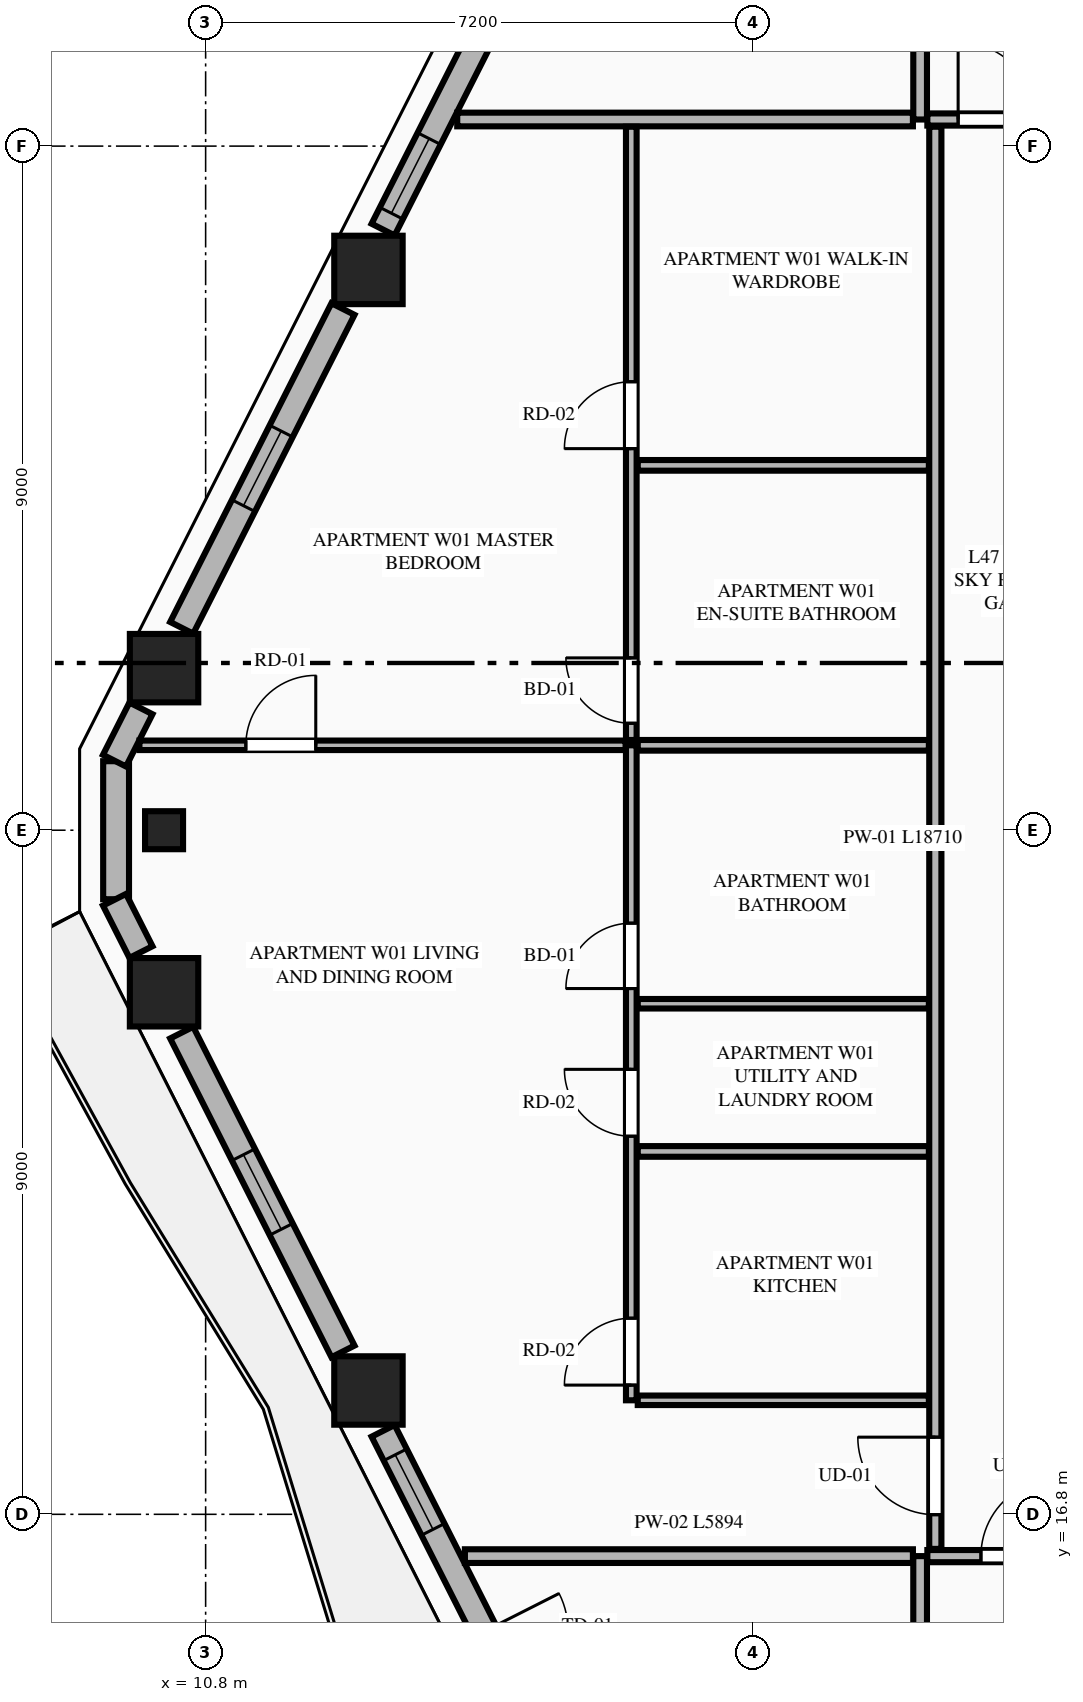
"""IFC4 building model, lengths in metres.
Left out: names, types, materials, properties, quantities, classifications, styles, units other than length and angle.
Written with IfcOpenShell. Run it as: python <this file> out.ifc"""

import sys

from ifc_helpers import new_model, si_unit, direction, frame, frame_2d, origin, origin_2d, place, context, subcontext, project, spatial, rectangle, extrude, element, fill, save


model = new_model("IFC4")
c1 = context("Model", 3, precision=1e-05, world=origin(), true_north=direction((0.0, 1.0)))
c2 = subcontext(c1, "Body", "Model", "MODEL_VIEW")
j1 = project(units=[si_unit("LENGTHUNIT", "METRE"), si_unit("PLANEANGLEUNIT", "RADIAN")], contexts=[c1])
p1 = place(None, origin())
s1 = spatial("IfcSite", under=j1, at=p1, CompositionType="ELEMENT")
p2 = place(p1, origin())
s2 = spatial("IfcBuilding", under=s1, at=p2, CompositionType="ELEMENT")
p3 = place(p2, frame((0.0, 0.0, 179.0)))
s3 = spatial("IfcBuildingStorey", under=s2, at=p3, CompositionType="ELEMENT", Elevation=179.0)
for number, where, z_axis, x_axis in (
    (1, (12.942, 33.171, 0.0), (0.0, 0.0, 1.0), (1.0, 0.0, 0.0)),
    (2, (10.253, 27.932, 0.0), (0.0, 0.0, 1.0), (1.0, 0.0, 0.0)),
    (3, (10.253, 23.668, 0.0), (0.0, 0.0, 1.0), (1.0, 0.0, 0.0)),
    (4, (12.942, 18.429, 0.0), (0.0, 0.0, 1.0), (1.0, 0.0, 0.0)),
):
    element("IfcColumn", number, at=place(p3, frame(where, z_axis=z_axis, x_axis=x_axis)), inside=s3, PredefinedType="COLUMN", context=c2, shape_type="SweptSolid", body=[
        extrude(rectangle(XDim=0.9, YDim=0.9, at=origin_2d()), origin(), (0.0, 0.0, 1.0), 3.55),
    ])
p4 = place(p3, frame((10.253, 25.8, 0.0), z_axis=(0.0, 0.0, 1.0), x_axis=(0.0, -1.0, 0.0)))
e5 = element("IfcColumn", 5, at=p4, inside=s3, PredefinedType="PILASTER", context=c2, shape_type="SweptSolid", body=[
    extrude(rectangle(XDim=0.5, YDim=0.35, at=origin_2d()), origin(), (0.0, 0.0, 1.0), 3.55),
])
p5 = place(p3, frame((9.622, 26.708, 0.0), z_axis=(0.0, 0.0, 1.0), x_axis=(0.0, -1.0, 0.0)))
e6 = element("IfcWall", 6, at=p5, inside=s3, PredefinedType="STANDARD", context=c2, shape_type="SweptSolid", body=[
    extrude(rectangle(XDim=1.816, YDim=0.34, at=frame_2d((0.908, 0.0))), origin(), (0.0, 0.0, 1.0), 3.35),
])
p6 = place(p3, frame((15.352, 38.083, 0.0), z_axis=(0.0, 0.0, 1.0), x_axis=(-0.451524246964, -0.89225884944, 0.0)))
e7 = element("IfcWall", 7, at=p6, inside=s3, PredefinedType="STANDARD", context=c2, shape_type="SweptSolid", body=[
    extrude(rectangle(XDim=4.91, YDim=0.34, at=frame_2d((2.455, 0.0))), origin(), (0.0, 0.0, 1.0), 2.883),
])
p7 = place(p6, frame((0.963, 0.0, 0.75)))
e8 = element("IfcOpeningElement", 8, at=p7, cuts=e7, PredefinedType="OPENING", context=c2, shape_type="SweptSolid", body=[
    extrude(rectangle(XDim=1.1, YDim=1.983, at=frame_2d((0.55, 0.991))), frame((0.0, 0.18, 0.0), z_axis=(0.0, -1.0, 0.0), x_axis=(1.0, 0.0, 0.0)), (0.0, 0.0, 1.0), 0.36),
])
p8 = place(p6, frame((3.569, 0.0, 0.75)))
e9 = element("IfcOpeningElement", 9, at=p8, cuts=e7, PredefinedType="OPENING", context=c2, shape_type="SweptSolid", body=[
    extrude(rectangle(XDim=1.1, YDim=1.983, at=frame_2d((0.55, 0.991))), frame((0.0, 0.18, 0.0), z_axis=(0.0, -1.0, 0.0), x_axis=(1.0, 0.0, 0.0)), (0.0, 0.0, 1.0), 0.36),
])
p9 = place(p3, frame((12.607, 32.657, 0.0), z_axis=(0.0, 0.0, 1.0), x_axis=(-0.451426298588, -0.892308409096, 0.0)))
e10 = element("IfcWall", 10, at=p9, inside=s3, PredefinedType="STANDARD", context=c2, shape_type="SweptSolid", body=[
    extrude(rectangle(XDim=4.7, YDim=0.34, at=frame_2d((2.35, 0.0))), origin(), (0.0, 0.0, 1.0), 2.883),
])
p10 = place(p9, frame((1.8, 0.0, 0.75)))
e11 = element("IfcOpeningElement", 11, at=p10, cuts=e10, PredefinedType="OPENING", context=c2, shape_type="SweptSolid", body=[
    extrude(rectangle(XDim=1.1, YDim=1.983, at=frame_2d((0.55, 0.991))), frame((0.0, 0.18, 0.0), z_axis=(0.0, -1.0, 0.0), x_axis=(1.0, 0.0, 0.0)), (0.0, 0.0, 1.0), 0.36),
])
for number, where, z_axis, x_axis in (
    (12, (9.949, 27.403, 0.0), (0.0, 0.0, 1.0), (-0.451, -0.892, 0.0)),
    (13, (9.601, 24.885, 0.0), (0.0, 0.0, 1.0), (0.451, -0.892, 0.0)),
):
    element("IfcWall", number, at=place(p3, frame(where, z_axis=z_axis, x_axis=x_axis)), inside=s3, PredefinedType="STANDARD", context=c2, shape_type="SweptSolid", body=[
        extrude(rectangle(XDim=0.771, YDim=0.34, at=frame_2d((0.385, 0.0))), origin(), (0.0, 0.0, 1.0), 3.35),
    ])
p11 = place(p3, frame((10.485, 23.137, 0.0), z_axis=(0.0, 0.0, 1.0), x_axis=(0.451447222193, -0.892297823361, 0.0)))
e14 = element("IfcWall", 14, at=p11, inside=s3, PredefinedType="STANDARD", context=c2, shape_type="SweptSolid", body=[
    extrude(rectangle(XDim=4.7, YDim=0.34, at=frame_2d((2.35, 0.0))), origin(), (0.0, 0.0, 1.0), 2.883),
])
p12 = place(p11, frame((1.8, 0.0, 0.75)))
e15 = element("IfcOpeningElement", 15, at=p12, cuts=e14, PredefinedType="OPENING", context=c2, shape_type="SweptSolid", body=[
    extrude(rectangle(XDim=1.1, YDim=1.983, at=frame_2d((0.55, 0.991))), frame((0.0, 0.18, 0.0), z_axis=(0.0, -1.0, 0.0), x_axis=(1.0, 0.0, 0.0)), (0.0, 0.0, 1.0), 0.36),
])
p13 = place(p3, frame((13.135, 17.898, 0.0), z_axis=(0.0, 0.0, 1.0), x_axis=(0.451544279509, -0.892248711763, 0.0)))
e16 = element("IfcWall", 16, at=p13, inside=s3, PredefinedType="STANDARD", context=c2, shape_type="SweptSolid", body=[
    extrude(rectangle(XDim=4.91, YDim=0.34, at=frame_2d((2.455, 0.0))), origin(), (0.0, 0.0, 1.0), 2.883),
])
p14 = place(p13, frame((2.954, 0.0, 0.0)))
e17 = element("IfcOpeningElement", 17, at=p14, cuts=e16, PredefinedType="OPENING", context=c2, shape_type="SweptSolid", body=[
    extrude(rectangle(XDim=1.1, YDim=2.25, at=frame_2d((0.55, 1.125))), frame((0.0, 0.18, 0.0), z_axis=(0.0, -1.0, 0.0), x_axis=(1.0, 0.0, 0.0)), (0.0, 0.0, 1.0), 0.36),
])
p15 = place(p13, frame((0.353, 0.0, 0.75)))
e18 = element("IfcOpeningElement", 18, at=p15, cuts=e16, PredefinedType="OPENING", context=c2, shape_type="SweptSolid", body=[
    extrude(rectangle(XDim=1.1, YDim=1.983, at=frame_2d((0.55, 0.991))), frame((0.0, 0.18, 0.0), z_axis=(0.0, -1.0, 0.0), x_axis=(1.0, 0.0, 0.0)), (0.0, 0.0, 1.0), 0.36),
])
p16 = place(p3, frame((20.2, 5.968, 0.0), z_axis=(0.0, 0.0, 1.0), x_axis=(0.0, 1.0, 0.0)))
e19 = element("IfcWall", 19, at=p16, inside=s3, PredefinedType="PARTITIONING", context=c2, shape_type="SweptSolid", body=[
    extrude(rectangle(XDim=10.282, YDim=0.18, at=frame_2d((5.141, 0.0))), origin(), (0.0, 0.0, 1.0), 3.35),
])
p17 = place(p3, frame((20.295, 16.25, 0.0), z_axis=(0.0, 0.0, 1.0), x_axis=(1.0, 0.0, 0.0)))
e20 = element("IfcWall", 20, at=p17, inside=s3, PredefinedType="PARTITIONING", context=c2, shape_type="SweptSolid", body=[
    extrude(rectangle(XDim=8.467, YDim=0.16, at=frame_2d((4.233, 0.0))), origin(), (0.0, 0.0, 1.0), 3.35),
])
p18 = place(p17, frame((0.705, 0.0, 0.0)))
e21 = element("IfcOpeningElement", 21, at=p18, cuts=e20, PredefinedType="OPENING", context=c2, shape_type="SweptSolid", body=[
    extrude(rectangle(XDim=1.02, YDim=2.25, at=frame_2d((0.51, 1.125))), frame((0.0, 0.09, 0.0), z_axis=(0.0, -1.0, 0.0), x_axis=(1.0, 0.0, 0.0)), (0.0, 0.0, 1.0), 0.18),
])
p19 = place(p3, frame((20.2, 35.15, 0.0), z_axis=(0.0, 0.0, 1.0), x_axis=(0.0, 1.0, 0.0)))
e22 = element("IfcWall", 22, at=p19, inside=s3, PredefinedType="PARTITIONING", context=c2, shape_type="SweptSolid", body=[
    extrude(rectangle(XDim=10.482, YDim=0.18, at=frame_2d((5.241, 0.0))), origin(), (0.0, 0.0, 1.0), 3.35),
])
p20 = place(p3, frame((20.295, 35.15, 0.0), z_axis=(0.0, 0.0, 1.0), x_axis=(1.0, 0.0, 0.0)))
e23 = element("IfcWall", 23, at=p20, inside=s3, PredefinedType="PARTITIONING", context=c2, shape_type="SweptSolid", body=[
    extrude(rectangle(XDim=15.553, YDim=0.16, at=frame_2d((7.776, 0.0))), origin(), (0.0, 0.0, 1.0), 3.35),
])
p21 = place(p20, frame((0.405, 0.0, 0.0)))
e24 = element("IfcOpeningElement", 24, at=p21, cuts=e23, PredefinedType="OPENING", context=c2, shape_type="SweptSolid", body=[
    extrude(rectangle(XDim=1.02, YDim=2.25, at=frame_2d((0.51, 1.125))), frame((0.0, 0.09, 0.0), z_axis=(0.0, -1.0, 0.0), x_axis=(1.0, 0.0, 0.0)), (0.0, 0.0, 1.0), 0.18),
])
p22 = place(p3, frame((14.211, 16.25, 0.0), z_axis=(0.0, 0.0, 1.0), x_axis=(1.0, 0.0, 0.0)))
e25 = element("IfcWall", 25, at=p22, inside=s3, PredefinedType="PARTITIONING", context=c2, shape_type="SweptSolid", body=[
    extrude(rectangle(XDim=5.894, YDim=0.18, at=frame_2d((2.947, 0.0))), origin(), (0.0, 0.0, 1.0), 3.35),
])
p23 = place(p3, frame((14.11, 35.15, 0.0), z_axis=(0.0, 0.0, 1.0), x_axis=(1.0, 0.0, 0.0)))
e26 = element("IfcWall", 26, at=p23, inside=s3, PredefinedType="PARTITIONING", context=c2, shape_type="SweptSolid", body=[
    extrude(rectangle(XDim=5.995, YDim=0.18, at=frame_2d((2.998, 0.0))), origin(), (0.0, 0.0, 1.0), 3.35),
])
p24 = place(p3, frame((20.4, 16.345, 0.0), z_axis=(0.0, 0.0, 1.0), x_axis=(0.0, 1.0, 0.0)))
e27 = element("IfcWall", 27, at=p24, inside=s3, PredefinedType="PARTITIONING", context=c2, shape_type="SweptSolid", body=[
    extrude(rectangle(XDim=18.71, YDim=0.16, at=frame_2d((9.355, 0.0))), origin(), (0.0, 0.0, 1.0), 3.35),
])
p25 = place(p24, frame((0.45, 0.0, 0.0)))
e28 = element("IfcOpeningElement", 28, at=p25, cuts=e27, PredefinedType="OPENING", context=c2, shape_type="SweptSolid", body=[
    extrude(rectangle(XDim=1.02, YDim=2.25, at=frame_2d((0.51, 1.125))), frame((0.0, 0.09, 0.0), z_axis=(0.0, -1.0, 0.0), x_axis=(1.0, 0.0, 0.0)), (0.0, 0.0, 1.0), 0.18),
])
p26 = place(p3, frame((16.485, 18.3, 0.0), z_axis=(0.0, 0.0, 1.0), x_axis=(1.0, 0.0, 0.0)))
e29 = element("IfcWall", 29, at=p26, inside=s3, PredefinedType="PARTITIONING", context=c2, shape_type="SweptSolid", body=[
    extrude(rectangle(XDim=3.83, YDim=0.125, at=frame_2d((1.915, 0.0))), origin(), (0.0, 0.0, 1.0), 2.807),
])
p27 = place(p3, frame((16.4, 18.3, 0.0), z_axis=(0.0, 0.0, 1.0), x_axis=(0.0, 1.0, 0.0)))
e30 = element("IfcWall", 30, at=p27, inside=s3, PredefinedType="PLUMBINGWALL", context=c2, shape_type="SweptSolid", body=[
    extrude(rectangle(XDim=8.617, YDim=0.14, at=frame_2d((4.309, 0.0))), origin(), (0.0, 0.0, 1.0), 3.35),
])
p28 = place(p27, frame((0.2, 0.0, 0.0)))
e31 = element("IfcOpeningElement", 31, at=p28, cuts=e30, PredefinedType="OPENING", context=c2, shape_type="SweptSolid", body=[
    extrude(rectangle(XDim=0.88, YDim=2.15, at=frame_2d((0.44, 1.075))), frame((0.0, 0.08, 0.0), z_axis=(0.0, -1.0, 0.0), x_axis=(1.0, 0.0, 0.0)), (0.0, 0.0, 1.0), 0.16),
])
p29 = place(p27, frame((3.474, 0.0, 0.0)))
e32 = element("IfcOpeningElement", 32, at=p29, cuts=e30, PredefinedType="OPENING", context=c2, shape_type="SweptSolid", body=[
    extrude(rectangle(XDim=0.88, YDim=2.15, at=frame_2d((0.44, 1.075))), frame((0.0, 0.08, 0.0), z_axis=(0.0, -1.0, 0.0), x_axis=(1.0, 0.0, 0.0)), (0.0, 0.0, 1.0), 0.16),
])
p30 = place(p27, frame((5.417, 0.0, 0.0)))
e33 = element("IfcOpeningElement", 33, at=p30, cuts=e30, PredefinedType="OPENING", context=c2, shape_type="SweptSolid", body=[
    extrude(rectangle(XDim=0.86, YDim=2.1, at=frame_2d((0.43, 1.05))), frame((0.0, 0.08, 0.0), z_axis=(0.0, -1.0, 0.0), x_axis=(1.0, 0.0, 0.0)), (0.0, 0.0, 1.0), 0.16),
])
p31 = place(p3, frame((16.4, 26.987, 0.0), z_axis=(0.0, 0.0, 1.0), x_axis=(0.0, 1.0, 0.0)))
e34 = element("IfcWall", 34, at=p31, inside=s3, PredefinedType="PLUMBINGWALL", context=c2, shape_type="SweptSolid", body=[
    extrude(rectangle(XDim=8.068, YDim=0.14, at=frame_2d((4.034, 0.0))), origin(), (0.0, 0.0, 1.0), 3.35),
])
p32 = place(p31, frame((0.22, 0.0, 0.0)))
e35 = element("IfcOpeningElement", 35, at=p32, cuts=e34, PredefinedType="OPENING", context=c2, shape_type="SweptSolid", body=[
    extrude(rectangle(XDim=0.86, YDim=2.1, at=frame_2d((0.43, 1.05))), frame((0.0, 0.08, 0.0), z_axis=(0.0, -1.0, 0.0), x_axis=(1.0, 0.0, 0.0)), (0.0, 0.0, 1.0), 0.16),
])
p33 = place(p31, frame((3.833, 0.0, 0.0)))
e36 = element("IfcOpeningElement", 36, at=p33, cuts=e34, PredefinedType="OPENING", context=c2, shape_type="SweptSolid", body=[
    extrude(rectangle(XDim=0.88, YDim=2.15, at=frame_2d((0.44, 1.075))), frame((0.0, 0.08, 0.0), z_axis=(0.0, -1.0, 0.0), x_axis=(1.0, 0.0, 0.0)), (0.0, 0.0, 1.0), 0.16),
])
p34 = place(p3, frame((16.485, 26.917, 0.0), z_axis=(0.0, 0.0, 1.0), x_axis=(1.0, 0.0, 0.0)))
e37 = element("IfcWall", 37, at=p34, inside=s3, PredefinedType="PLUMBINGWALL", context=c2, shape_type="SweptSolid", body=[
    extrude(rectangle(XDim=3.83, YDim=0.14, at=frame_2d((1.915, 0.0))), origin(), (0.0, 0.0, 1.0), 3.35),
])
p35 = place(p3, frame((9.929, 26.917, 0.0), z_axis=(0.0, 0.0, 1.0), x_axis=(1.0, 0.0, 0.0)))
e38 = element("IfcWall", 38, at=p35, inside=s3, PredefinedType="PARTITIONING", context=c2, shape_type="SweptSolid", body=[
    extrude(rectangle(XDim=6.396, YDim=0.125, at=frame_2d((3.198, 0.0))), origin(), (0.0, 0.0, 1.0), 3.35),
])
p36 = place(p35, frame((1.4, 0.0, 0.0)))
e39 = element("IfcOpeningElement", 39, at=p36, cuts=e38, PredefinedType="OPENING", context=c2, shape_type="SweptSolid", body=[
    extrude(rectangle(XDim=0.92, YDim=2.15, at=frame_2d((0.46, 1.075))), frame((0.0, 0.073, 0.0), z_axis=(0.0, -1.0, 0.0), x_axis=(1.0, 0.0, 0.0)), (0.0, 0.0, 1.0), 0.145),
])
p37 = place(p3, frame((16.485, 21.574, 0.0), z_axis=(0.0, 0.0, 1.0), x_axis=(1.0, 0.0, 0.0)))
e40 = element("IfcWall", 40, at=p37, inside=s3, PredefinedType="PLUMBINGWALL", context=c2, shape_type="SweptSolid", body=[
    extrude(rectangle(XDim=3.83, YDim=0.14, at=frame_2d((1.915, 0.0))), origin(), (0.0, 0.0, 1.0), 3.35),
])
p38 = place(p3, frame((16.485, 23.517, 0.0), z_axis=(0.0, 0.0, 1.0), x_axis=(1.0, 0.0, 0.0)))
e41 = element("IfcWall", 41, at=p38, inside=s3, PredefinedType="PARTITIONING", context=c2, shape_type="SweptSolid", body=[
    extrude(rectangle(XDim=3.83, YDim=0.125, at=frame_2d((1.915, 0.0))), origin(), (0.0, 0.0, 1.0), 3.35),
])
p39 = place(p3, frame((16.485, 30.6, 0.0), z_axis=(0.0, 0.0, 1.0), x_axis=(1.0, 0.0, 0.0)))
e42 = element("IfcWall", 42, at=p39, inside=s3, PredefinedType="PLUMBINGWALL", context=c2, shape_type="SweptSolid", body=[
    extrude(rectangle(XDim=3.83, YDim=0.14, at=frame_2d((1.915, 0.0))), origin(), (0.0, 0.0, 1.0), 3.35),
])
p40 = place(p10, origin())
e43 = element("IfcWindow", 43, at=p40, inside=s3, PartitioningType="SINGLE_PANEL", PredefinedType="WINDOW", context=c2, shape_type="SweptSolid", body=[
    extrude(rectangle(XDim=1.1, YDim=1.983, at=frame_2d((0.55, 0.991))), frame((0.0, 0.03, 0.0), z_axis=(0.0, -1.0, 0.0), x_axis=(1.0, 0.0, 0.0)), (0.0, 0.0, 1.0), 0.06),
])
fill(e11, e43)
p41 = place(p12, origin())
e44 = element("IfcWindow", 44, at=p41, inside=s3, PartitioningType="SINGLE_PANEL", PredefinedType="WINDOW", context=c2, shape_type="SweptSolid", body=[
    extrude(rectangle(XDim=1.1, YDim=1.983, at=frame_2d((0.55, 0.991))), frame((0.0, 0.03, 0.0), z_axis=(0.0, -1.0, 0.0), x_axis=(1.0, 0.0, 0.0)), (0.0, 0.0, 1.0), 0.06),
])
fill(e15, e44)
p42 = place(p18, origin())
e45 = element("IfcDoor", 45, at=p42, inside=s3, OperationType="SINGLE_SWING_RIGHT", PredefinedType="DOOR", context=c2, shape_type="SweptSolid", body=[
    extrude(rectangle(XDim=1.02, YDim=2.25, at=frame_2d((0.51, 1.125))), frame((0.0, 0.025, 0.0), z_axis=(0.0, -1.0, 0.0), x_axis=(1.0, 0.0, 0.0)), (0.0, 0.0, 1.0), 0.05),
])
fill(e21, e45)
p43 = place(p21, origin())
e46 = element("IfcDoor", 46, at=p43, inside=s3, OperationType="SINGLE_SWING_LEFT", PredefinedType="DOOR", context=c2, shape_type="SweptSolid", body=[
    extrude(rectangle(XDim=1.02, YDim=2.25, at=frame_2d((0.51, 1.125))), frame((0.0, 0.025, 0.0), z_axis=(0.0, -1.0, 0.0), x_axis=(1.0, 0.0, 0.0)), (0.0, 0.0, 1.0), 0.05),
])
fill(e24, e46)
p44 = place(p28, origin())
e47 = element("IfcDoor", 47, at=p44, inside=s3, OperationType="SINGLE_SWING_LEFT", PredefinedType="DOOR", context=c2, shape_type="SweptSolid", body=[
    extrude(rectangle(XDim=0.88, YDim=2.15, at=frame_2d((0.44, 1.075))), frame((0.0, 0.025, 0.0), z_axis=(0.0, -1.0, 0.0), x_axis=(1.0, 0.0, 0.0)), (0.0, 0.0, 1.0), 0.05),
])
fill(e31, e47)
p45 = place(p29, origin())
e48 = element("IfcDoor", 48, at=p45, inside=s3, OperationType="SINGLE_SWING_RIGHT", PredefinedType="DOOR", context=c2, shape_type="SweptSolid", body=[
    extrude(rectangle(XDim=0.88, YDim=2.15, at=frame_2d((0.44, 1.075))), frame((0.0, 0.025, 0.0), z_axis=(0.0, -1.0, 0.0), x_axis=(1.0, 0.0, 0.0)), (0.0, 0.0, 1.0), 0.05),
])
fill(e32, e48)
p46 = place(p30, origin())
e49 = element("IfcDoor", 49, at=p46, inside=s3, OperationType="SINGLE_SWING_LEFT", PredefinedType="DOOR", context=c2, shape_type="SweptSolid", body=[
    extrude(rectangle(XDim=0.86, YDim=2.1, at=frame_2d((0.43, 1.05))), frame((0.0, 0.025, 0.0), z_axis=(0.0, -1.0, 0.0), x_axis=(1.0, 0.0, 0.0)), (0.0, 0.0, 1.0), 0.05),
])
fill(e33, e49)
p47 = place(p32, origin())
e50 = element("IfcDoor", 50, at=p47, inside=s3, OperationType="SINGLE_SWING_RIGHT", PredefinedType="DOOR", context=c2, shape_type="SweptSolid", body=[
    extrude(rectangle(XDim=0.86, YDim=2.1, at=frame_2d((0.43, 1.05))), frame((0.0, 0.025, 0.0), z_axis=(0.0, -1.0, 0.0), x_axis=(1.0, 0.0, 0.0)), (0.0, 0.0, 1.0), 0.05),
])
fill(e35, e50)
p48 = place(p33, origin())
e51 = element("IfcDoor", 51, at=p48, inside=s3, OperationType="SINGLE_SWING_LEFT", PredefinedType="DOOR", context=c2, shape_type="SweptSolid", body=[
    extrude(rectangle(XDim=0.88, YDim=2.15, at=frame_2d((0.44, 1.075))), frame((0.0, 0.025, 0.0), z_axis=(0.0, -1.0, 0.0), x_axis=(1.0, 0.0, 0.0)), (0.0, 0.0, 1.0), 0.05),
])
fill(e36, e51)
p49 = place(p25, origin())
e52 = element("IfcDoor", 52, at=p49, inside=s3, OperationType="SINGLE_SWING_RIGHT", PredefinedType="DOOR", context=c2, shape_type="SweptSolid", body=[
    extrude(rectangle(XDim=1.02, YDim=2.25, at=frame_2d((0.51, 1.125))), frame((0.0, 0.025, 0.0), z_axis=(0.0, -1.0, 0.0), x_axis=(1.0, 0.0, 0.0)), (0.0, 0.0, 1.0), 0.05),
])
fill(e28, e52)
p50 = place(p36, origin())
e53 = element("IfcDoor", 53, at=p50, inside=s3, OperationType="SINGLE_SWING_RIGHT", PredefinedType="DOOR", context=c2, shape_type="SweptSolid", body=[
    extrude(rectangle(XDim=0.92, YDim=2.15, at=frame_2d((0.46, 1.075))), frame((0.0, 0.025, 0.0), z_axis=(0.0, -1.0, 0.0), x_axis=(1.0, 0.0, 0.0)), (0.0, 0.0, 1.0), 0.05),
])
fill(e39, e53)
p51 = place(p8, origin())
e54 = element("IfcWindow", 54, at=p51, inside=s3, PartitioningType="SINGLE_PANEL", PredefinedType="WINDOW", context=c2, shape_type="SweptSolid", body=[
    extrude(rectangle(XDim=1.1, YDim=1.983, at=frame_2d((0.55, 0.991))), frame((0.0, 0.03, 0.0), z_axis=(0.0, -1.0, 0.0), x_axis=(1.0, 0.0, 0.0)), (0.0, 0.0, 1.0), 0.06),
])
fill(e9, e54)
p52 = place(p15, origin())
e55 = element("IfcWindow", 55, at=p52, inside=s3, PartitioningType="SINGLE_PANEL", PredefinedType="WINDOW", context=c2, shape_type="SweptSolid", body=[
    extrude(rectangle(XDim=1.1, YDim=1.983, at=frame_2d((0.55, 0.991))), frame((0.0, 0.03, 0.0), z_axis=(0.0, -1.0, 0.0), x_axis=(1.0, 0.0, 0.0)), (0.0, 0.0, 1.0), 0.06),
])
fill(e18, e55)
save(model, sys.argv[1])
